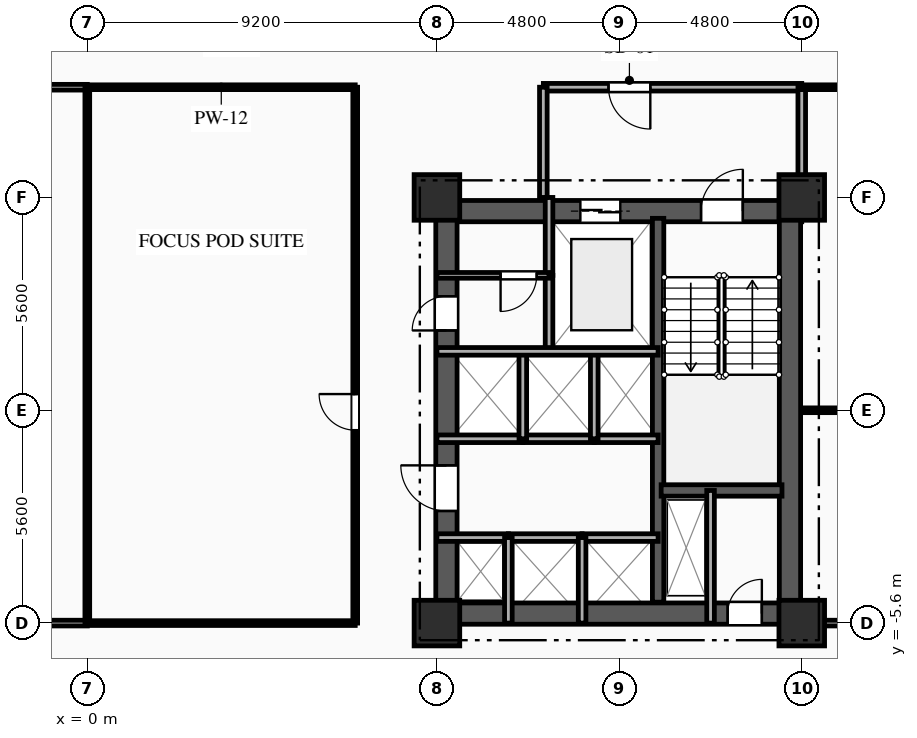
"""IFC4 building model, lengths in metres.
Left out: names, types, materials, properties, quantities, classifications, styles, units other than length and angle.
Written with IfcOpenShell. Run it as: python <this file> out.ifc"""

import sys

from ifc_helpers import new_model, si_unit, direction, frame, frame_2d, origin, origin_2d, place, context, subcontext, project, spatial, rectangle, extrude, element, fill, save


model = new_model("IFC4")
c1 = context("Model", 3, precision=1e-05, world=origin(), true_north=direction((0.0, 1.0)))
c2 = subcontext(c1, "Body", "Model", "MODEL_VIEW")
j1 = project(units=[si_unit("LENGTHUNIT", "METRE"), si_unit("PLANEANGLEUNIT", "RADIAN")], contexts=[c1])
p1 = place(None, origin())
s1 = spatial("IfcSite", under=j1, at=p1, CompositionType="ELEMENT")
p2 = place(p1, origin())
s2 = spatial("IfcBuilding", under=s1, at=p2, CompositionType="ELEMENT")
p3 = place(p2, frame((0.0, 0.0, 67.2)))
s3 = spatial("IfcBuildingStorey", under=s2, at=p3, CompositionType="ELEMENT", Elevation=67.2)
for number, where, z_axis, x_axis in (
    (1, (9.2, -5.6, 0.0), (0.0, 0.0, 1.0), (1.0, 0.0, 0.0)),
    (2, (9.2, 5.6, 0.0), (0.0, 0.0, 1.0), (1.0, 0.0, 0.0)),
    (3, (18.8, -5.6, 0.0), (0.0, 0.0, 1.0), (1.0, 0.0, 0.0)),
    (4, (18.8, 5.6, 0.0), (0.0, 0.0, 1.0), (1.0, 0.0, 0.0)),
):
    element("IfcColumn", number, at=place(p3, frame(where, z_axis=z_axis, x_axis=x_axis)), inside=s3, PredefinedType="COLUMN", context=c2, shape_type="SweptSolid", body=[
        extrude(rectangle(XDim=1.2, YDim=1.2, at=origin_2d()), origin(), (0.0, 0.0, 1.0), 3.35),
    ])
p4 = place(p3, frame((9.2, 5.24, 0.0), z_axis=(0.0, 0.0, 1.0), x_axis=(1.0, 0.0, 0.0)))
e5 = element("IfcWall", 5, at=p4, inside=s3, PredefinedType="SHEAR", context=c2, shape_type="SweptSolid", body=[
    extrude(rectangle(XDim=9.6, YDim=0.56, at=frame_2d((4.8, 0.0))), origin(), (0.0, 0.0, 1.0), 3.035),
])
p5 = place(p4, frame((6.95, 0.0, 0.0)))
e6 = element("IfcOpeningElement", 6, at=p5, cuts=e5, PredefinedType="OPENING", context=c2, shape_type="SweptSolid", body=[
    extrude(rectangle(XDim=1.1, YDim=2.15, at=frame_2d((0.55, 1.075))), frame((0.0, 0.29, 0.0), z_axis=(0.0, -1.0, 0.0), x_axis=(1.0, 0.0, 0.0)), (0.0, 0.0, 1.0), 0.58),
])
p6 = place(p4, frame((3.775, 0.0, 0.0)))
e7 = element("IfcOpeningElement", 7, at=p6, cuts=e5, PredefinedType="OPENING", context=c2, shape_type="SweptSolid", body=[
    extrude(rectangle(XDim=1.05, YDim=2.1, at=frame_2d((0.525, 1.05))), frame((0.0, 0.29, 0.0), z_axis=(0.0, -1.0, 0.0), x_axis=(1.0, 0.0, 0.0)), (0.0, 0.0, 1.0), 0.58),
])
p7 = place(p3, frame((9.2, -5.35, 0.0), z_axis=(0.0, 0.0, 1.0), x_axis=(1.0, 0.0, 0.0)))
e8 = element("IfcWall", 8, at=p7, inside=s3, PredefinedType="SHEAR", context=c2, shape_type="SweptSolid", body=[
    extrude(rectangle(XDim=9.6, YDim=0.56, at=frame_2d((4.8, 0.0))), origin(), (0.0, 0.0, 1.0), 3.035),
])
p8 = place(p7, frame((7.65, 0.0, 0.0)))
e9 = element("IfcOpeningElement", 9, at=p8, cuts=e8, PredefinedType="OPENING", context=c2, shape_type="SweptSolid", body=[
    extrude(rectangle(XDim=0.9, YDim=2.1, at=frame_2d((0.45, 1.05))), frame((0.0, 0.29, 0.0), z_axis=(0.0, -1.0, 0.0), x_axis=(1.0, 0.0, 0.0)), (0.0, 0.0, 1.0), 0.58),
])
p9 = place(p3, frame((9.45, -5.05, 0.0), z_axis=(0.0, 0.0, 1.0), x_axis=(0.0, 1.0, 0.0)))
e10 = element("IfcWall", 10, at=p9, inside=s3, PredefinedType="SHEAR", context=c2, shape_type="SweptSolid", body=[
    extrude(rectangle(XDim=10.1, YDim=0.56, at=frame_2d((5.05, 0.0))), origin(), (0.0, 0.0, 1.0), 3.035),
])
p10 = place(p9, frame((7.15, 0.0, 0.0)))
e11 = element("IfcOpeningElement", 11, at=p10, cuts=e10, PredefinedType="OPENING", context=c2, shape_type="SweptSolid", body=[
    extrude(rectangle(XDim=0.9, YDim=2.1, at=frame_2d((0.45, 1.05))), frame((0.0, 0.29, 0.0), z_axis=(0.0, -1.0, 0.0), x_axis=(1.0, 0.0, 0.0)), (0.0, 0.0, 1.0), 0.58),
])
p11 = place(p9, frame((2.4, 0.0, 0.0)))
e12 = element("IfcOpeningElement", 12, at=p11, cuts=e10, PredefinedType="OPENING", context=c2, shape_type="SweptSolid", body=[
    extrude(rectangle(XDim=1.2, YDim=2.15, at=frame_2d((0.6, 1.075))), frame((0.0, 0.29, 0.0), z_axis=(0.0, -1.0, 0.0), x_axis=(1.0, 0.0, 0.0)), (0.0, 0.0, 1.0), 0.58),
])
p12 = place(p3, frame((18.49, -5.05, 0.0), z_axis=(0.0, 0.0, 1.0), x_axis=(0.0, 1.0, 0.0)))
e13 = element("IfcWall", 13, at=p12, inside=s3, PredefinedType="SHEAR", context=c2, shape_type="SweptSolid", body=[
    extrude(rectangle(XDim=10.1, YDim=0.56, at=frame_2d((5.05, 0.0))), origin(), (0.0, 0.0, 1.0), 3.035),
])
p13 = place(p3, frame((15.02, -5.05, 0.0), z_axis=(0.0, 0.0, 1.0), x_axis=(0.0, 1.0, 0.0)))
e14 = element("IfcWall", 14, at=p13, inside=s3, PredefinedType="SHEAR", context=c2, shape_type="SweptSolid", body=[
    extrude(rectangle(XDim=10.1, YDim=0.3, at=frame_2d((5.05, 0.0))), origin(), (0.0, 0.0, 1.0), 3.035),
])
p14 = place(p3, frame((15.1, -2.11, 0.0), z_axis=(0.0, 0.0, 1.0), x_axis=(1.0, 0.0, 0.0)))
e15 = element("IfcWall", 15, at=p14, inside=s3, PredefinedType="SHEAR", context=c2, shape_type="SweptSolid", body=[
    extrude(rectangle(XDim=3.18, YDim=0.3, at=frame_2d((1.59, 0.0))), origin(), (0.0, 0.0, 1.0), 3.035),
])
p15 = place(p3, frame((16.4, -2.11, 0.0), z_axis=(0.0, 0.0, 1.0), x_axis=(0.0, -1.0, 0.0)))
e16 = element("IfcWall", 16, at=p15, inside=s3, PredefinedType="PARTITIONING", context=c2, shape_type="SweptSolid", body=[
    extrude(rectangle(XDim=3.49, YDim=0.2, at=frame_2d((1.745, 0.0))), origin(), (0.0, 0.0, 1.0), 3.035),
])
p16 = place(p3, frame((12.15, 3.55, 0.0), z_axis=(0.0, 0.0, 1.0), x_axis=(0.0, -1.0, 0.0)))
e17 = element("IfcWall", 17, at=p16, inside=s3, PredefinedType="PARTITIONING", context=c2, shape_type="SweptSolid", body=[
    extrude(rectangle(XDim=2.0, YDim=0.2, at=frame_2d((1.0, 0.0))), origin(), (0.0, 0.0, 1.0), 3.035),
])
p17 = place(p3, frame((12.15, 5.6, 0.0), z_axis=(0.0, 0.0, 1.0), x_axis=(0.0, -1.0, 0.0)))
e18 = element("IfcWall", 18, at=p17, inside=s3, PredefinedType="PARTITIONING", context=c2, shape_type="SweptSolid", body=[
    extrude(rectangle(XDim=2.05, YDim=0.2, at=frame_2d((1.025, 0.0))), origin(), (0.0, 0.0, 1.0), 3.035),
])
p18 = place(p3, frame((18.8, 8.5, 0.0), z_axis=(0.0, 0.0, 1.0), x_axis=(-1.0, 0.0, 0.0)))
e19 = element("IfcWall", 19, at=p18, inside=s3, PredefinedType="PARTITIONING", context=c2, shape_type="SweptSolid", body=[
    extrude(rectangle(XDim=6.8, YDim=0.2, at=frame_2d((3.4, 0.0))), origin(), (0.0, 0.0, 1.0), 3.035),
])
p19 = place(p18, frame((3.985, 0.0, 0.0)))
e20 = element("IfcOpeningElement", 20, at=p19, cuts=e19, PredefinedType="OPENING", context=c2, shape_type="SweptSolid", body=[
    extrude(rectangle(XDim=1.1, YDim=2.15, at=frame_2d((0.55, 1.075))), frame((0.0, 0.11, 0.0), z_axis=(0.0, -1.0, 0.0), x_axis=(1.0, 0.0, 0.0)), (0.0, 0.0, 1.0), 0.22),
])
p20 = place(p3, frame((12.0, 8.5, 0.0), z_axis=(0.0, 0.0, 1.0), x_axis=(0.0, -1.0, 0.0)))
e21 = element("IfcWall", 21, at=p20, inside=s3, PredefinedType="PARTITIONING", context=c2, shape_type="SweptSolid", body=[
    extrude(rectangle(XDim=2.9, YDim=0.2, at=frame_2d((1.45, 0.0))), origin(), (0.0, 0.0, 1.0), 3.035),
])
p21 = place(p3, frame((18.8, 5.6, 0.0), z_axis=(0.0, 0.0, 1.0), x_axis=(0.0, 1.0, 0.0)))
e22 = element("IfcWall", 22, at=p21, inside=s3, PredefinedType="PARTITIONING", context=c2, shape_type="SweptSolid", body=[
    extrude(rectangle(XDim=2.9, YDim=0.2, at=frame_2d((1.45, 0.0))), origin(), (0.0, 0.0, 1.0), 2.52),
])
p22 = place(p3, frame((12.15, 3.55, 0.0), z_axis=(0.0, 0.0, 1.0), x_axis=(-1.0, 0.0, 0.0)))
e23 = element("IfcWall", 23, at=p22, inside=s3, PredefinedType="PARTITIONING", context=c2, shape_type="SweptSolid", body=[
    extrude(rectangle(XDim=2.95, YDim=0.15, at=frame_2d((1.475, 0.0))), origin(), (0.0, 0.0, 1.0), 3.035),
])
p23 = place(p22, frame((0.325, 0.0, 0.0)))
e24 = element("IfcOpeningElement", 24, at=p23, cuts=e23, PredefinedType="OPENING", context=c2, shape_type="SweptSolid", body=[
    extrude(rectangle(XDim=0.95, YDim=2.1, at=frame_2d((0.475, 1.05))), frame((0.0, 0.085, 0.0), z_axis=(0.0, -1.0, 0.0), x_axis=(1.0, 0.0, 0.0)), (0.0, 0.0, 1.0), 0.17),
])
p24 = place(p3, frame((9.2, -3.35, 0.0), z_axis=(0.0, 0.0, 1.0), x_axis=(1.0, 0.0, 0.0)))
e25 = element("IfcWall", 25, at=p24, inside=s3, PredefinedType="PARTITIONING", context=c2, shape_type="SweptSolid", body=[
    extrude(rectangle(XDim=1.88, YDim=0.2, at=frame_2d((0.94, 0.0))), origin(), (0.0, 0.0, 1.0), 2.75),
])
p25 = place(p3, frame((11.08, -3.35, 0.0), z_axis=(0.0, 0.0, 1.0), x_axis=(1.0, 0.0, 0.0)))
e26 = element("IfcWall", 26, at=p25, inside=s3, PredefinedType="PARTITIONING", context=c2, shape_type="SweptSolid", body=[
    extrude(rectangle(XDim=1.94, YDim=0.2, at=frame_2d((0.97, 0.0))), origin(), (0.0, 0.0, 1.0), 3.035),
])
p26 = place(p3, frame((13.02, -3.35, 0.0), z_axis=(0.0, 0.0, 1.0), x_axis=(1.0, 0.0, 0.0)))
e27 = element("IfcWall", 27, at=p26, inside=s3, PredefinedType="PARTITIONING", context=c2, shape_type="SweptSolid", body=[
    extrude(rectangle(XDim=2.0, YDim=0.2, at=frame_2d((1.0, 0.0))), origin(), (0.0, 0.0, 1.0), 3.035),
])
p27 = place(p3, frame((11.46, -0.75, 0.0), z_axis=(0.0, 0.0, 1.0), x_axis=(-1.0, 0.0, 0.0)))
e28 = element("IfcWall", 28, at=p27, inside=s3, PredefinedType="PARTITIONING", context=c2, shape_type="SweptSolid", body=[
    extrude(rectangle(XDim=2.26, YDim=0.2, at=frame_2d((1.13, 0.0))), origin(), (0.0, 0.0, 1.0), 3.035),
])
p28 = place(p3, frame((13.34, -0.75, 0.0), z_axis=(0.0, 0.0, 1.0), x_axis=(-1.0, 0.0, 0.0)))
e29 = element("IfcWall", 29, at=p28, inside=s3, PredefinedType="PARTITIONING", context=c2, shape_type="SweptSolid", body=[
    extrude(rectangle(XDim=1.88, YDim=0.2, at=frame_2d((0.94, 0.0))), origin(), (0.0, 0.0, 1.0), 3.035),
])
p29 = place(p3, frame((15.02, -0.75, 0.0), z_axis=(0.0, 0.0, 1.0), x_axis=(-1.0, 0.0, 0.0)))
e30 = element("IfcWall", 30, at=p29, inside=s3, PredefinedType="PARTITIONING", context=c2, shape_type="SweptSolid", body=[
    extrude(rectangle(XDim=1.68, YDim=0.2, at=frame_2d((0.84, 0.0))), origin(), (0.0, 0.0, 1.0), 3.035),
])
for number, where, z_axis, x_axis in (
    (31, (11.08, -5.6, 0.0), (0.0, 0.0, 1.0), (0.0, 1.0, 0.0)),
    (32, (13.02, -5.6, 0.0), (0.0, 0.0, 1.0), (0.0, 1.0, 0.0)),
):
    element("IfcWall", number, at=place(p3, frame(where, z_axis=z_axis, x_axis=x_axis)), inside=s3, PredefinedType="PARTITIONING", context=c2, shape_type="SweptSolid", body=[
        extrude(rectangle(XDim=2.25, YDim=0.2, at=frame_2d((1.125, 0.0))), origin(), (0.0, 0.0, 1.0), 3.035),
    ])
for number, where, z_axis, x_axis in (
    (33, (11.46, -0.75, 0.0), (0.0, 0.0, 1.0), (0.0, 1.0, 0.0)),
    (34, (13.34, -0.75, 0.0), (0.0, 0.0, 1.0), (0.0, 1.0, 0.0)),
):
    element("IfcWall", number, at=place(p3, frame(where, z_axis=z_axis, x_axis=x_axis)), inside=s3, PredefinedType="PARTITIONING", context=c2, shape_type="SweptSolid", body=[
        extrude(rectangle(XDim=2.3, YDim=0.2, at=frame_2d((1.15, 0.0))), origin(), (0.0, 0.0, 1.0), 3.035),
    ])
p30 = place(p3, frame((0.0, 8.5, 0.0), z_axis=(0.0, 0.0, 1.0), x_axis=(-1.0, 0.0, 0.0)))
e35 = element("IfcWall", 35, at=p30, inside=s3, PredefinedType="PARTITIONING", context=c2, shape_type="SweptSolid", body=[
    extrude(rectangle(XDim=7.05, YDim=0.15, at=frame_2d((3.525, 0.0))), origin(), (0.0, 0.0, 1.0), 3.035),
])
p31 = place(p3, frame((23.0, 8.5, 0.0), z_axis=(0.0, 0.0, 1.0), x_axis=(-1.0, 0.0, 0.0)))
e36 = element("IfcWall", 36, at=p31, inside=s3, PredefinedType="PARTITIONING", context=c2, shape_type="SweptSolid", body=[
    extrude(rectangle(XDim=4.2, YDim=0.125, at=frame_2d((2.1, 0.0))), origin(), (0.0, 0.0, 1.0), 3.035),
])
p32 = place(p31, frame((0.841, 0.0, 0.0)))
e37 = element("IfcOpeningElement", 37, at=p32, cuts=e36, PredefinedType="OPENING", context=c2, shape_type="SweptSolid", body=[
    extrude(rectangle(XDim=0.95, YDim=2.1, at=frame_2d((0.475, 1.05))), frame((0.0, 0.073, 0.0), z_axis=(0.0, -1.0, 0.0), x_axis=(1.0, 0.0, 0.0)), (0.0, 0.0, 1.0), 0.145),
])
p33 = place(p3, frame((7.05, 8.5, 0.0), z_axis=(0.0, 0.0, 1.0), x_axis=(-1.0, 0.0, 0.0)))
e38 = element("IfcWall", 38, at=p33, inside=s3, PredefinedType="PARTITIONING", context=c2, shape_type="SweptSolid", body=[
    extrude(rectangle(XDim=7.05, YDim=0.125, at=frame_2d((3.525, 0.0))), origin(), (0.0, 0.0, 1.0), 3.035),
])
p34 = place(p3, frame((-7.05, -5.6, 0.0), z_axis=(0.0, 0.0, 1.0), x_axis=(1.0, 0.0, 0.0)))
e39 = element("IfcWall", 39, at=p34, inside=s3, PredefinedType="PARTITIONING", context=c2, shape_type="SweptSolid", body=[
    extrude(rectangle(XDim=7.05, YDim=0.15, at=frame_2d((3.525, 0.0))), origin(), (0.0, 0.0, 1.0), 2.52),
])
p35 = place(p3, frame((18.8, -5.6, 0.0), z_axis=(0.0, 0.0, 1.0), x_axis=(1.0, 0.0, 0.0)))
e40 = element("IfcWall", 40, at=p35, inside=s3, PredefinedType="PARTITIONING", context=c2, shape_type="SweptSolid", body=[
    extrude(rectangle(XDim=4.2, YDim=0.15, at=frame_2d((2.1, 0.0))), origin(), (0.0, 0.0, 1.0), 3.035),
])
p36 = place(p35, frame((2.321, 0.0, 0.0)))
e41 = element("IfcOpeningElement", 41, at=p36, cuts=e40, PredefinedType="OPENING", context=c2, shape_type="SweptSolid", body=[
    extrude(rectangle(XDim=1.05, YDim=2.15, at=frame_2d((0.525, 1.075))), frame((0.0, 0.085, 0.0), z_axis=(0.0, -1.0, 0.0), x_axis=(1.0, 0.0, 0.0)), (0.0, 0.0, 1.0), 0.17),
])
p37 = place(p3, frame((0.0, -5.6, 0.0), z_axis=(0.0, 0.0, 1.0), x_axis=(1.0, 0.0, 0.0)))
e42 = element("IfcWall", 42, at=p37, inside=s3, PredefinedType="PARTITIONING", context=c2, shape_type="SweptSolid", body=[
    extrude(rectangle(XDim=7.05, YDim=0.125, at=frame_2d((3.525, 0.0))), origin(), (0.0, 0.0, 1.0), 2.52),
])
p38 = place(p3, frame((7.05, -5.6, 0.0), z_axis=(0.0, 0.0, 1.0), x_axis=(0.0, 1.0, 0.0)))
e43 = element("IfcWall", 43, at=p38, inside=s3, PredefinedType="PARTITIONING", context=c2, shape_type="SweptSolid", body=[
    extrude(rectangle(XDim=14.1, YDim=0.125, at=frame_2d((7.05, 0.0))), origin(), (0.0, 0.0, 1.0), 3.035),
])
p39 = place(p38, frame((5.076, 0.0, 0.0)))
e44 = element("IfcOpeningElement", 44, at=p39, cuts=e43, PredefinedType="OPENING", context=c2, shape_type="SweptSolid", body=[
    extrude(rectangle(XDim=0.95, YDim=2.1, at=frame_2d((0.475, 1.05))), frame((0.0, 0.073, 0.0), z_axis=(0.0, -1.0, 0.0), x_axis=(1.0, 0.0, 0.0)), (0.0, 0.0, 1.0), 0.145),
])
p40 = place(p3, frame((18.8, 0.0, 0.0), z_axis=(0.0, 0.0, 1.0), x_axis=(1.0, 0.0, 0.0)))
e45 = element("IfcWall", 45, at=p40, inside=s3, PredefinedType="PARTITIONING", context=c2, shape_type="SweptSolid", body=[
    extrude(rectangle(XDim=14.0, YDim=0.125, at=frame_2d((7.0, 0.0))), origin(), (0.0, 0.0, 1.0), 3.035),
])
p41 = place(p3, frame((0.0, 8.5, 0.0), z_axis=(0.0, 0.0, 1.0), x_axis=(0.0, -1.0, 0.0)))
e46 = element("IfcWall", 46, at=p41, inside=s3, PredefinedType="PARTITIONING", context=c2, shape_type="SweptSolid", body=[
    extrude(rectangle(XDim=14.1, YDim=0.125, at=frame_2d((7.05, 0.0))), origin(), (0.0, 0.0, 1.0), 3.035),
])
p42 = place(p3, frame((9.2, 1.55, 0.0), z_axis=(0.0, 0.0, 1.0), x_axis=(1.0, 0.0, 0.0)))
e47 = element("IfcWall", 47, at=p42, inside=s3, PredefinedType="PARTITIONING", context=c2, shape_type="SweptSolid", body=[
    extrude(rectangle(XDim=5.82, YDim=0.2, at=frame_2d((2.91, 0.0))), origin(), (0.0, 0.0, 1.0), 3.035),
])
p43 = place(p5, origin())
e48 = element("IfcDoor", 48, at=p43, inside=s3, OperationType="SINGLE_SWING_RIGHT", PredefinedType="DOOR", context=c2, shape_type="SweptSolid", body=[
    extrude(rectangle(XDim=1.1, YDim=2.15, at=frame_2d((0.55, 1.075))), frame((0.0, 0.025, 0.0), z_axis=(0.0, -1.0, 0.0), x_axis=(1.0, 0.0, 0.0)), (0.0, 0.0, 1.0), 0.05),
])
fill(e6, e48)
p44 = place(p6, origin())
e49 = element("IfcDoor", 49, at=p44, inside=s3, OperationType="DOUBLE_DOOR_SLIDING", PredefinedType="DOOR", context=c2, shape_type="SweptSolid", body=[
    extrude(rectangle(XDim=1.05, YDim=2.1, at=frame_2d((0.525, 1.05))), frame((0.0, 0.025, 0.0), z_axis=(0.0, -1.0, 0.0), x_axis=(1.0, 0.0, 0.0)), (0.0, 0.0, 1.0), 0.05),
])
fill(e7, e49)
p45 = place(p8, origin())
e50 = element("IfcDoor", 50, at=p45, inside=s3, OperationType="SINGLE_SWING_RIGHT", PredefinedType="DOOR", context=c2, shape_type="SweptSolid", body=[
    extrude(rectangle(XDim=0.9, YDim=2.1, at=frame_2d((0.45, 1.05))), frame((0.0, 0.025, 0.0), z_axis=(0.0, -1.0, 0.0), x_axis=(1.0, 0.0, 0.0)), (0.0, 0.0, 1.0), 0.05),
])
fill(e9, e50)
p46 = place(p19, origin())
e51 = element("IfcDoor", 51, at=p46, inside=s3, OperationType="SINGLE_SWING_LEFT", PredefinedType="DOOR", context=c2, shape_type="SweptSolid", body=[
    extrude(rectangle(XDim=1.1, YDim=2.15, at=frame_2d((0.55, 1.075))), frame((0.0, 0.025, 0.0), z_axis=(0.0, -1.0, 0.0), x_axis=(1.0, 0.0, 0.0)), (0.0, 0.0, 1.0), 0.05),
])
fill(e20, e51)
p47 = place(p23, origin())
e52 = element("IfcDoor", 52, at=p47, inside=s3, OperationType="SINGLE_SWING_RIGHT", PredefinedType="DOOR", context=c2, shape_type="SweptSolid", body=[
    extrude(rectangle(XDim=0.95, YDim=2.1, at=frame_2d((0.475, 1.05))), frame((0.0, 0.025, 0.0), z_axis=(0.0, -1.0, 0.0), x_axis=(1.0, 0.0, 0.0)), (0.0, 0.0, 1.0), 0.05),
])
fill(e24, e52)
p48 = place(p10, origin())
e53 = element("IfcDoor", 53, at=p48, inside=s3, OperationType="SINGLE_SWING_LEFT", PredefinedType="DOOR", context=c2, shape_type="SweptSolid", body=[
    extrude(rectangle(XDim=0.9, YDim=2.1, at=frame_2d((0.45, 1.05))), frame((0.0, 0.025, 0.0), z_axis=(0.0, -1.0, 0.0), x_axis=(1.0, 0.0, 0.0)), (0.0, 0.0, 1.0), 0.05),
])
fill(e11, e53)
p49 = place(p11, origin())
e54 = element("IfcDoor", 54, at=p49, inside=s3, OperationType="SINGLE_SWING_RIGHT", PredefinedType="DOOR", context=c2, shape_type="SweptSolid", body=[
    extrude(rectangle(XDim=1.2, YDim=2.15, at=frame_2d((0.6, 1.075))), frame((0.0, 0.025, 0.0), z_axis=(0.0, -1.0, 0.0), x_axis=(1.0, 0.0, 0.0)), (0.0, 0.0, 1.0), 0.05),
])
fill(e12, e54)
p50 = place(p39, origin())
e55 = element("IfcDoor", 55, at=p50, inside=s3, OperationType="SINGLE_SWING_RIGHT", PredefinedType="DOOR", context=c2, shape_type="SweptSolid", body=[
    extrude(rectangle(XDim=0.95, YDim=2.1, at=frame_2d((0.475, 1.05))), frame((0.0, 0.025, 0.0), z_axis=(0.0, -1.0, 0.0), x_axis=(1.0, 0.0, 0.0)), (0.0, 0.0, 1.0), 0.05),
])
fill(e44, e55)
save(model, sys.argv[1])
